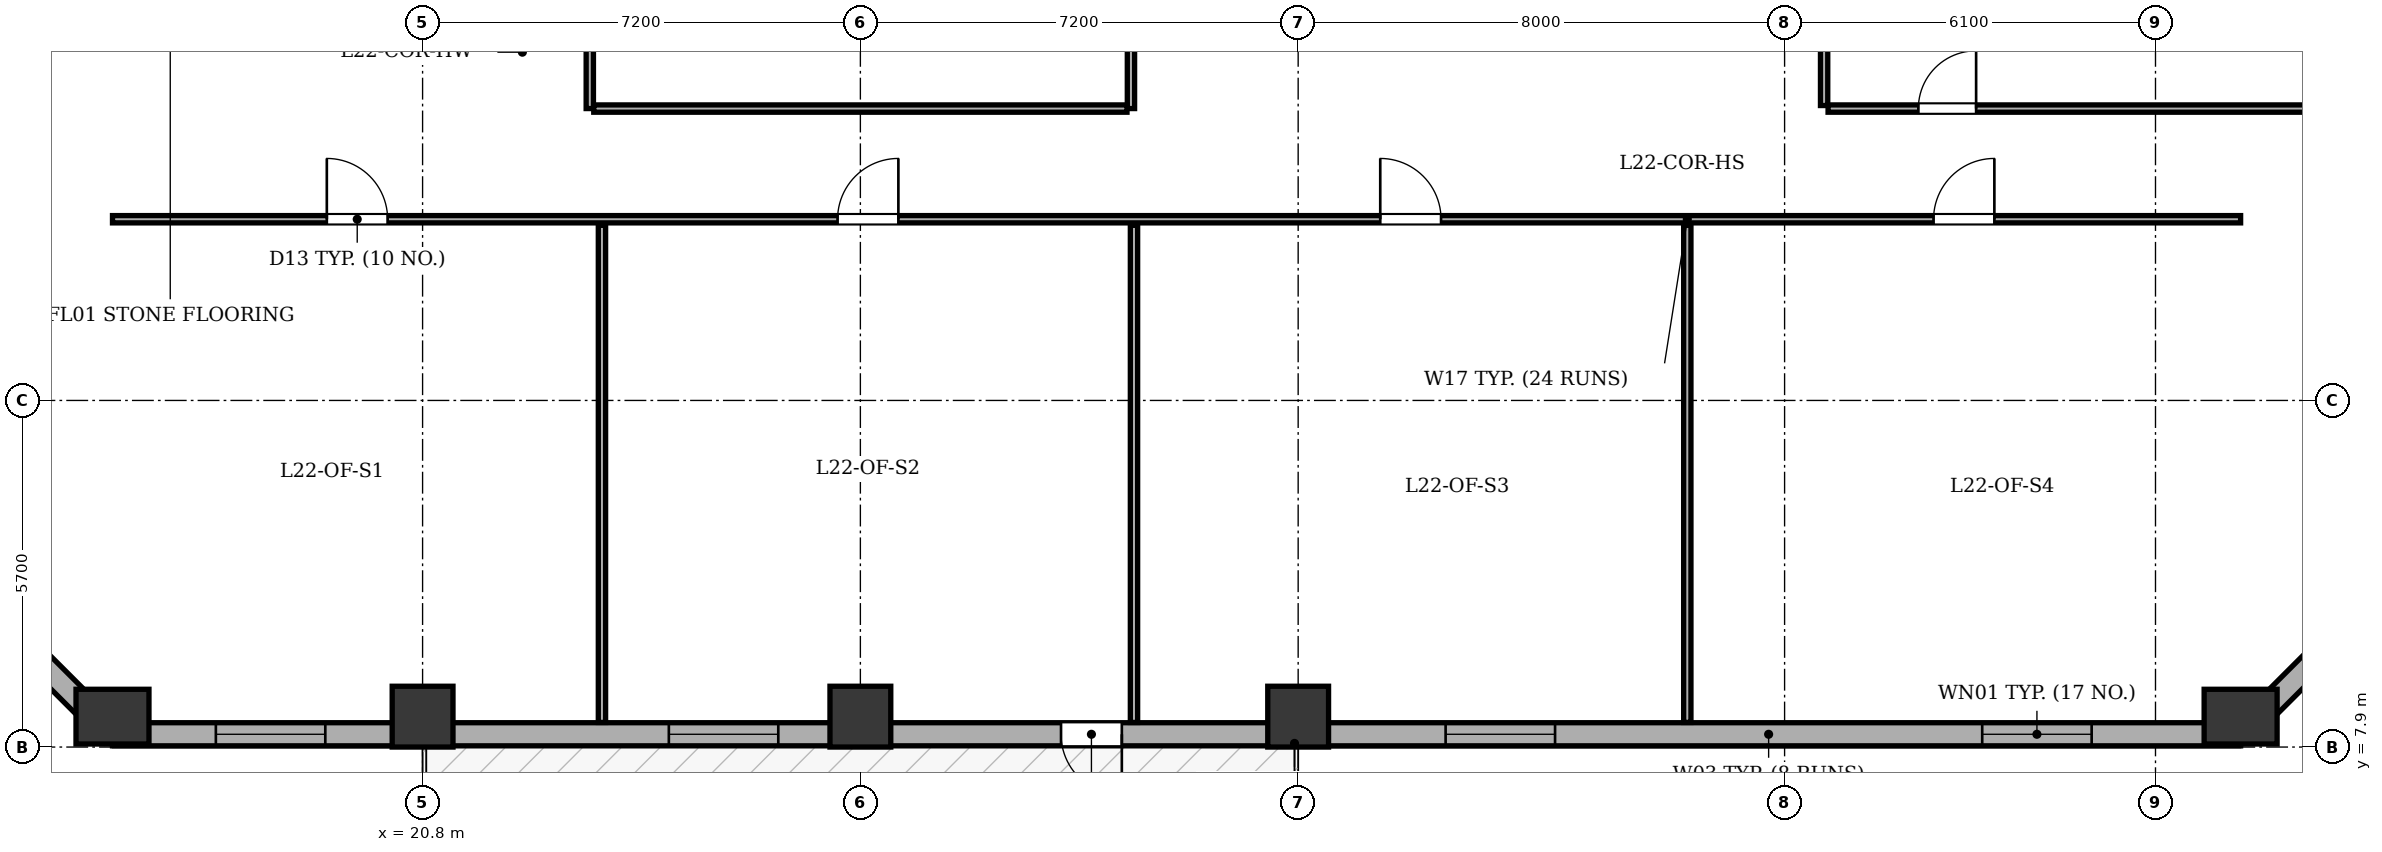
"""IFC4 building model, lengths in metres.
Left out: names, types, materials, properties, quantities, classifications, styles, units other than length and angle.
Written with IfcOpenShell. Run it as: python <this file> out.ifc"""

import sys

from ifc_helpers import new_model, si_unit, direction, frame, frame_2d, origin, origin_2d, place, context, subcontext, project, spatial, rectangle, extrude, element, fill, save


model = new_model("IFC4")
c1 = context("Model", 3, precision=1e-05, world=origin(), true_north=direction((0.0, 1.0)))
c2 = subcontext(c1, "Body", "Model", "MODEL_VIEW")
j1 = project(units=[si_unit("LENGTHUNIT", "METRE"), si_unit("PLANEANGLEUNIT", "RADIAN")], contexts=[c1])
p1 = place(None, origin())
s1 = spatial("IfcSite", under=j1, at=p1, CompositionType="ELEMENT")
p2 = place(p1, origin())
s2 = spatial("IfcBuilding", under=s1, at=p2, CompositionType="ELEMENT")
p3 = place(p2, frame((0.0, 0.0, 90.6)))
s3 = spatial("IfcBuildingStorey", under=s2, at=p3, CompositionType="ELEMENT", Elevation=90.6)
p4 = place(p3, frame((15.7, 8.4, 0.0), z_axis=(0.0, 0.0, 1.0), x_axis=(1.0, 0.0, 0.0)))
e1 = element("IfcColumn", 1, at=p4, inside=s3, PredefinedType="COLUMN", context=c2, shape_type="SweptSolid", body=[
    extrude(rectangle(XDim=0.9, YDim=1.2, at=origin_2d()), origin(), (0.0, 0.0, 1.0), 3.9),
])
for number, where, z_axis, x_axis in (
    (2, (20.8, 8.4, 0.0), (0.0, 0.0, 1.0), (1.0, 0.0, 0.0)),
    (3, (28.0, 8.4, 0.0), (0.0, 0.0, 1.0), (1.0, 0.0, 0.0)),
    (4, (35.2, 8.4, 0.0), (0.0, 0.0, 1.0), (1.0, 0.0, 0.0)),
):
    element("IfcColumn", number, at=place(p3, frame(where, z_axis=z_axis, x_axis=x_axis)), inside=s3, PredefinedType="COLUMN", context=c2, shape_type="SweptSolid", body=[
        extrude(rectangle(XDim=1.0, YDim=1.0, at=origin_2d()), origin(), (0.0, 0.0, 1.0), 3.9),
    ])
p5 = place(p3, frame((50.7, 8.4, 0.0), z_axis=(0.0, 0.0, 1.0), x_axis=(1.0, 0.0, 0.0)))
e5 = element("IfcColumn", 5, at=p5, inside=s3, PredefinedType="COLUMN", context=c2, shape_type="SweptSolid", body=[
    extrude(rectangle(XDim=0.9, YDim=1.2, at=origin_2d()), origin(), (0.0, 0.0, 1.0), 3.9),
])
p6 = place(p3, frame((50.7, 8.11, 0.0), z_axis=(0.0, 0.0, 1.0), x_axis=(-1.0, 0.0, 0.0)))
e6 = element("IfcWall", 6, at=p6, inside=s3, PredefinedType="STANDARD", context=c2, shape_type="SweptSolid", body=[
    extrude(rectangle(XDim=35.0, YDim=0.38, at=frame_2d((17.5, 0.0))), origin(), (0.0, 0.0, 1.0), 2.835),
])
p7 = place(p6, frame((18.4, 0.0, 0.0)))
e7 = element("IfcOpeningElement", 7, at=p7, cuts=e6, PredefinedType="OPENING", context=c2, shape_type="SweptSolid", body=[
    extrude(rectangle(XDim=1.0, YDim=2.02, at=frame_2d((0.5, 1.01))), frame((0.0, 0.2, 0.0), z_axis=(0.0, -1.0, 0.0), x_axis=(1.0, 0.0, 0.0)), (0.0, 0.0, 1.0), 0.4),
])
p8 = place(p6, frame((2.45, 0.0, 0.8)))
e8 = element("IfcOpeningElement", 8, at=p8, cuts=e6, PredefinedType="OPENING", context=c2, shape_type="SweptSolid", body=[
    extrude(rectangle(XDim=1.8, YDim=1.9, at=frame_2d((0.9, 0.95))), frame((0.0, 0.2, 0.0), z_axis=(0.0, -1.0, 0.0), x_axis=(1.0, 0.0, 0.0)), (0.0, 0.0, 1.0), 0.4),
])
p9 = place(p6, frame((11.275, 0.0, 0.8)))
e9 = element("IfcOpeningElement", 9, at=p9, cuts=e6, PredefinedType="OPENING", context=c2, shape_type="SweptSolid", body=[
    extrude(rectangle(XDim=1.8, YDim=1.9, at=frame_2d((0.9, 0.95))), frame((0.0, 0.2, 0.0), z_axis=(0.0, -1.0, 0.0), x_axis=(1.0, 0.0, 0.0)), (0.0, 0.0, 1.0), 0.4),
])
p10 = place(p6, frame((24.05, 0.0, 0.8)))
e10 = element("IfcOpeningElement", 10, at=p10, cuts=e6, PredefinedType="OPENING", context=c2, shape_type="SweptSolid", body=[
    extrude(rectangle(XDim=1.8, YDim=1.9, at=frame_2d((0.9, 0.95))), frame((0.0, 0.2, 0.0), z_axis=(0.0, -1.0, 0.0), x_axis=(1.0, 0.0, 0.0)), (0.0, 0.0, 1.0), 0.4),
])
p11 = place(p6, frame((31.5, 0.0, 0.8)))
e11 = element("IfcOpeningElement", 11, at=p11, cuts=e6, PredefinedType="OPENING", context=c2, shape_type="SweptSolid", body=[
    extrude(rectangle(XDim=1.8, YDim=1.9, at=frame_2d((0.9, 0.95))), frame((0.0, 0.2, 0.0), z_axis=(0.0, -1.0, 0.0), x_axis=(1.0, 0.0, 0.0)), (0.0, 0.0, 1.0), 0.4),
])
p12 = place(p3, frame((15.7, 8.11, 0.0), z_axis=(0.0, 0.0, 1.0), x_axis=(-0.707124801467, 0.707088760447, 0.0)))
e12 = element("IfcWall", 12, at=p12, inside=s3, PredefinedType="STANDARD", context=c2, shape_type="SweptSolid", body=[
    extrude(rectangle(XDim=6.774, YDim=0.38, at=frame_2d((3.387, 0.0))), origin(), (0.0, 0.0, 1.0), 2.835),
])
p13 = place(p12, frame((2.687, 0.0, 0.8)))
e13 = element("IfcOpeningElement", 13, at=p13, cuts=e12, PredefinedType="OPENING", context=c2, shape_type="SweptSolid", body=[
    extrude(rectangle(XDim=1.4, YDim=1.65, at=frame_2d((0.7, 0.825))), frame((0.0, 0.2, 0.0), z_axis=(0.0, -1.0, 0.0), x_axis=(1.0, 0.0, 0.0)), (0.0, 0.0, 1.0), 0.4),
])
p14 = place(p3, frame((55.49, 12.9, 0.0), z_axis=(0.0, 0.0, 1.0), x_axis=(-0.707124801467, -0.707088760447, 0.0)))
e14 = element("IfcWall", 14, at=p14, inside=s3, PredefinedType="STANDARD", context=c2, shape_type="SweptSolid", body=[
    extrude(rectangle(XDim=6.774, YDim=0.38, at=frame_2d((3.387, 0.0))), origin(), (0.0, 0.0, 1.0), 2.835),
])
p15 = place(p14, frame((2.687, 0.0, 0.8)))
e15 = element("IfcOpeningElement", 15, at=p15, cuts=e14, PredefinedType="OPENING", context=c2, shape_type="SweptSolid", body=[
    extrude(rectangle(XDim=1.4, YDim=1.65, at=frame_2d((0.7, 0.825))), frame((0.0, 0.2, 0.0), z_axis=(0.0, -1.0, 0.0), x_axis=(1.0, 0.0, 0.0)), (0.0, 0.0, 1.0), 0.4),
])
for number, where, z_axis, x_axis in (
    (16, (23.55, 18.4, 0.0), (0.0, 0.0, 1.0), (0.0, 1.0, 0.0)),
    (17, (32.45, 18.4, 0.0), (0.0, 0.0, 1.0), (0.0, 1.0, 0.0)),
):
    element("IfcWall", number, at=place(p3, frame(where, z_axis=z_axis, x_axis=x_axis)), inside=s3, PredefinedType="PARTITIONING", context=c2, shape_type="SweptSolid", body=[
        extrude(rectangle(XDim=3.485, YDim=0.12, at=frame_2d((1.743, 0.0))), origin(), (0.0, 0.0, 1.0), 3.45),
    ])
p16 = place(p3, frame((23.615, 18.4, 0.0), z_axis=(0.0, 0.0, 1.0), x_axis=(1.0, 0.0, 0.0)))
e18 = element("IfcWall", 18, at=p16, inside=s3, PredefinedType="PARTITIONING", context=c2, shape_type="SweptSolid", body=[
    extrude(rectangle(XDim=8.77, YDim=0.12, at=frame_2d((4.385, 0.0))), origin(), (0.0, 0.0, 1.0), 3.45),
])
p17 = place(p3, frame((15.7, 16.58, 0.0), z_axis=(0.0, 0.0, 1.0), x_axis=(1.0, 0.0, 0.0)))
e19 = element("IfcWall", 19, at=p17, inside=s3, PredefinedType="PARTITIONING", context=c2, shape_type="SweptSolid", body=[
    extrude(rectangle(XDim=35.0, YDim=0.12, at=frame_2d((17.5, 0.0))), origin(), (0.0, 0.0, 1.0), 3.45),
])
p18 = place(p17, frame((3.525, 0.0, 0.0)))
e20 = element("IfcOpeningElement", 20, at=p18, cuts=e19, PredefinedType="OPENING", context=c2, shape_type="SweptSolid", body=[
    extrude(rectangle(XDim=1.0, YDim=2.1, at=frame_2d((0.5, 1.05))), frame((0.0, 0.07, 0.0), z_axis=(0.0, -1.0, 0.0), x_axis=(1.0, 0.0, 0.0)), (0.0, 0.0, 1.0), 0.14),
])
p19 = place(p17, frame((11.925, 0.0, 0.0)))
e21 = element("IfcOpeningElement", 21, at=p19, cuts=e19, PredefinedType="OPENING", context=c2, shape_type="SweptSolid", body=[
    extrude(rectangle(XDim=1.0, YDim=2.1, at=frame_2d((0.5, 1.05))), frame((0.0, 0.07, 0.0), z_axis=(0.0, -1.0, 0.0), x_axis=(1.0, 0.0, 0.0)), (0.0, 0.0, 1.0), 0.14),
])
p20 = place(p17, frame((20.85, 0.0, 0.0)))
e22 = element("IfcOpeningElement", 22, at=p20, cuts=e19, PredefinedType="OPENING", context=c2, shape_type="SweptSolid", body=[
    extrude(rectangle(XDim=1.0, YDim=2.1, at=frame_2d((0.5, 1.05))), frame((0.0, 0.07, 0.0), z_axis=(0.0, -1.0, 0.0), x_axis=(1.0, 0.0, 0.0)), (0.0, 0.0, 1.0), 0.14),
])
p21 = place(p17, frame((29.95, 0.0, 0.0)))
e23 = element("IfcOpeningElement", 23, at=p21, cuts=e19, PredefinedType="OPENING", context=c2, shape_type="SweptSolid", body=[
    extrude(rectangle(XDim=1.0, YDim=2.1, at=frame_2d((0.5, 1.05))), frame((0.0, 0.07, 0.0), z_axis=(0.0, -1.0, 0.0), x_axis=(1.0, 0.0, 0.0)), (0.0, 0.0, 1.0), 0.14),
])
for number, where, z_axis, x_axis in (
    (24, (23.75, 8.305, 0.0), (0.0, 0.0, 1.0), (0.0, 1.0, 0.0)),
    (25, (32.5, 8.305, 0.0), (0.0, 0.0, 1.0), (0.0, 1.0, 0.0)),
    (26, (41.6, 8.305, 0.0), (0.0, 0.0, 1.0), (0.0, 1.0, 0.0)),
):
    element("IfcWall", number, at=place(p3, frame(where, z_axis=z_axis, x_axis=x_axis)), inside=s3, PredefinedType="PARTITIONING", context=c2, shape_type="SweptSolid", body=[
        extrude(rectangle(XDim=8.175, YDim=0.12, at=frame_2d((4.087, 0.0))), origin(), (0.0, 0.0, 1.0), 3.45),
    ])
p22 = place(p3, frame((43.85, 18.45, 0.0), z_axis=(0.0, 0.0, 1.0), x_axis=(0.0, 1.0, 0.0)))
e27 = element("IfcWall", 27, at=p22, inside=s3, PredefinedType="PARTITIONING", context=c2, shape_type="SweptSolid", body=[
    extrude(rectangle(XDim=17.5, YDim=0.12, at=frame_2d((8.75, 0.0))), origin(), (0.0, 0.0, 1.0), 2.035),
])
p23 = place(p3, frame((43.915, 18.4, 0.0), z_axis=(0.0, 0.0, 1.0), x_axis=(1.0, 0.0, 0.0)))
e28 = element("IfcWall", 28, at=p23, inside=s3, PredefinedType="PARTITIONING", context=c2, shape_type="SweptSolid", body=[
    extrude(rectangle(XDim=11.38, YDim=0.12, at=frame_2d((5.69, 0.0))), origin(), (0.0, 0.0, 1.0), 3.45),
])
p24 = place(p23, frame((1.485, 0.0, 0.0)))
e29 = element("IfcOpeningElement", 29, at=p24, cuts=e28, PredefinedType="OPENING", context=c2, shape_type="SweptSolid", body=[
    extrude(rectangle(XDim=0.95, YDim=2.1, at=frame_2d((0.475, 1.05))), frame((0.0, 0.07, 0.0), z_axis=(0.0, -1.0, 0.0), x_axis=(1.0, 0.0, 0.0)), (0.0, 0.0, 1.0), 0.14),
])
p25 = place(p7, origin())
e30 = element("IfcDoor", 30, at=p25, inside=s3, OperationType="SINGLE_SWING_LEFT", PredefinedType="DOOR", context=c2, shape_type="SweptSolid", body=[
    extrude(rectangle(XDim=1.0, YDim=2.02, at=frame_2d((0.5, 1.01))), frame((0.0, 0.025, 0.0), z_axis=(0.0, -1.0, 0.0), x_axis=(1.0, 0.0, 0.0)), (0.0, 0.0, 1.0), 0.05),
])
fill(e7, e30)
p26 = place(p8, origin())
e31 = element("IfcWindow", 31, at=p26, inside=s3, PartitioningType="SINGLE_PANEL", PredefinedType="WINDOW", context=c2, shape_type="SweptSolid", body=[
    extrude(rectangle(XDim=1.8, YDim=1.9, at=frame_2d((0.9, 0.95))), frame((0.0, -0.01, 0.0), z_axis=(0.0, -1.0, 0.0), x_axis=(1.0, 0.0, 0.0)), (0.0, 0.0, 1.0), 0.06),
])
fill(e8, e31)
p27 = place(p9, origin())
e32 = element("IfcWindow", 32, at=p27, inside=s3, PartitioningType="SINGLE_PANEL", PredefinedType="WINDOW", context=c2, shape_type="SweptSolid", body=[
    extrude(rectangle(XDim=1.8, YDim=1.9, at=frame_2d((0.9, 0.95))), frame((0.0, -0.01, 0.0), z_axis=(0.0, -1.0, 0.0), x_axis=(1.0, 0.0, 0.0)), (0.0, 0.0, 1.0), 0.06),
])
fill(e9, e32)
p28 = place(p10, origin())
e33 = element("IfcWindow", 33, at=p28, inside=s3, PartitioningType="SINGLE_PANEL", PredefinedType="WINDOW", context=c2, shape_type="SweptSolid", body=[
    extrude(rectangle(XDim=1.8, YDim=1.9, at=frame_2d((0.9, 0.95))), frame((0.0, -0.01, 0.0), z_axis=(0.0, -1.0, 0.0), x_axis=(1.0, 0.0, 0.0)), (0.0, 0.0, 1.0), 0.06),
])
fill(e10, e33)
p29 = place(p11, origin())
e34 = element("IfcWindow", 34, at=p29, inside=s3, PartitioningType="SINGLE_PANEL", PredefinedType="WINDOW", context=c2, shape_type="SweptSolid", body=[
    extrude(rectangle(XDim=1.8, YDim=1.9, at=frame_2d((0.9, 0.95))), frame((0.0, -0.01, 0.0), z_axis=(0.0, -1.0, 0.0), x_axis=(1.0, 0.0, 0.0)), (0.0, 0.0, 1.0), 0.06),
])
fill(e11, e34)
p30 = place(p18, origin())
e35 = element("IfcDoor", 35, at=p30, inside=s3, OperationType="SINGLE_SWING_LEFT", PredefinedType="DOOR", context=c2, shape_type="SweptSolid", body=[
    extrude(rectangle(XDim=1.0, YDim=2.1, at=frame_2d((0.5, 1.05))), frame((0.0, 0.025, 0.0), z_axis=(0.0, -1.0, 0.0), x_axis=(1.0, 0.0, 0.0)), (0.0, 0.0, 1.0), 0.05),
])
fill(e20, e35)
p31 = place(p19, origin())
e36 = element("IfcDoor", 36, at=p31, inside=s3, OperationType="SINGLE_SWING_RIGHT", PredefinedType="DOOR", context=c2, shape_type="SweptSolid", body=[
    extrude(rectangle(XDim=1.0, YDim=2.1, at=frame_2d((0.5, 1.05))), frame((0.0, 0.025, 0.0), z_axis=(0.0, -1.0, 0.0), x_axis=(1.0, 0.0, 0.0)), (0.0, 0.0, 1.0), 0.05),
])
fill(e21, e36)
p32 = place(p20, origin())
e37 = element("IfcDoor", 37, at=p32, inside=s3, OperationType="SINGLE_SWING_LEFT", PredefinedType="DOOR", context=c2, shape_type="SweptSolid", body=[
    extrude(rectangle(XDim=1.0, YDim=2.1, at=frame_2d((0.5, 1.05))), frame((0.0, 0.025, 0.0), z_axis=(0.0, -1.0, 0.0), x_axis=(1.0, 0.0, 0.0)), (0.0, 0.0, 1.0), 0.05),
])
fill(e22, e37)
p33 = place(p21, origin())
e38 = element("IfcDoor", 38, at=p33, inside=s3, OperationType="SINGLE_SWING_RIGHT", PredefinedType="DOOR", context=c2, shape_type="SweptSolid", body=[
    extrude(rectangle(XDim=1.0, YDim=2.1, at=frame_2d((0.5, 1.05))), frame((0.0, 0.025, 0.0), z_axis=(0.0, -1.0, 0.0), x_axis=(1.0, 0.0, 0.0)), (0.0, 0.0, 1.0), 0.05),
])
fill(e23, e38)
p34 = place(p24, origin())
e39 = element("IfcDoor", 39, at=p34, inside=s3, OperationType="SINGLE_SWING_RIGHT", PredefinedType="DOOR", context=c2, shape_type="SweptSolid", body=[
    extrude(rectangle(XDim=0.95, YDim=2.1, at=frame_2d((0.475, 1.05))), frame((0.0, 0.025, 0.0), z_axis=(0.0, -1.0, 0.0), x_axis=(1.0, 0.0, 0.0)), (0.0, 0.0, 1.0), 0.05),
])
fill(e29, e39)
save(model, sys.argv[1])
